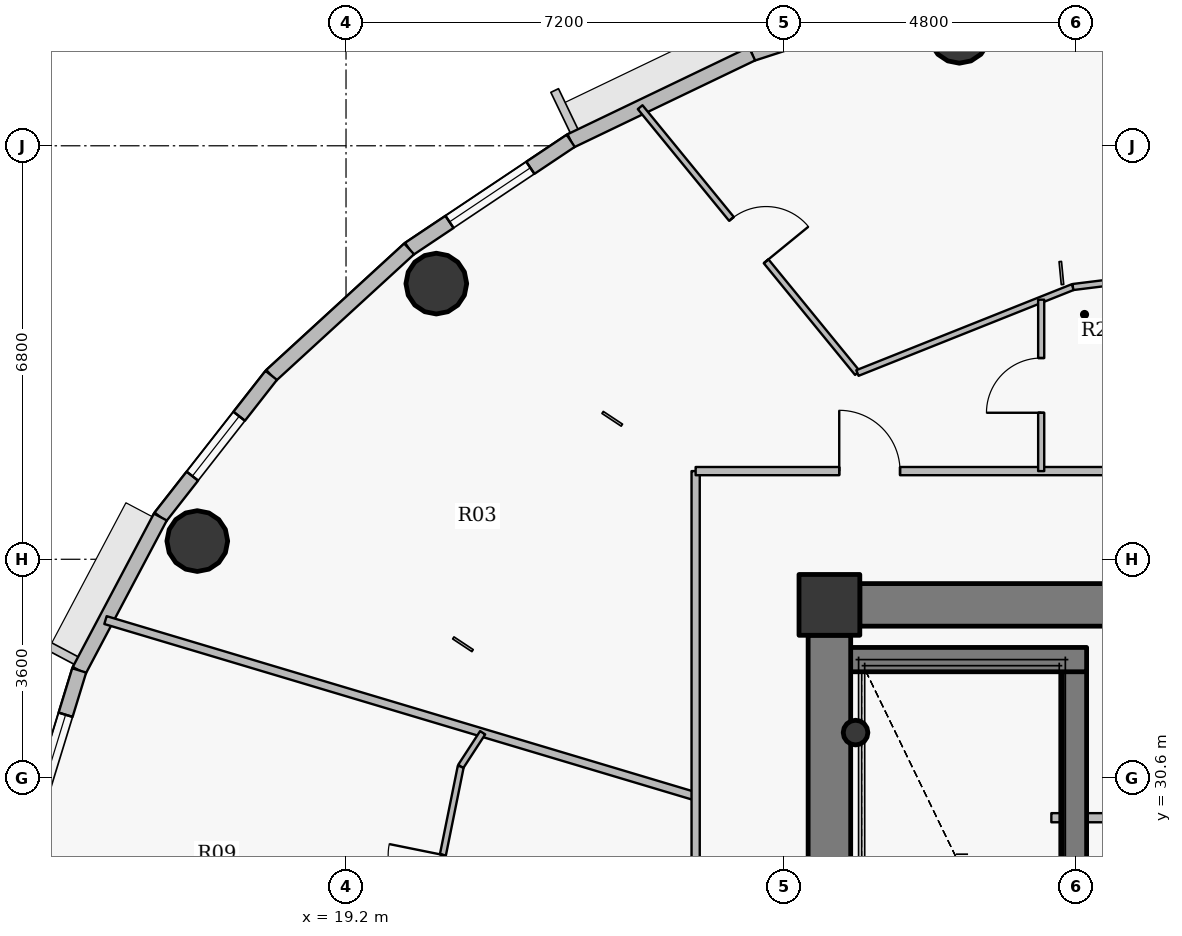
"""IFC4 building model, lengths in metres.
Left out: names, types, materials, properties, quantities, classifications, styles, units other than length and angle.
Written with IfcOpenShell. Run it as: python <this file> out.ifc"""

import sys

from ifc_helpers import new_model, si_unit, direction, frame, frame_2d, origin, origin_2d, place, context, subcontext, project, spatial, rectangle, hollow_circle, extrude, source, transform, mapped, element, fill, save


model = new_model("IFC4")
c1 = context("Model", 3, precision=1e-05, world=origin(), true_north=direction((0.0, 1.0)))
c2 = subcontext(c1, "Body", "Model", "MODEL_VIEW")
j1 = project(units=[si_unit("LENGTHUNIT", "METRE"), si_unit("PLANEANGLEUNIT", "RADIAN")], contexts=[c1])
p1 = place(None, origin())
s1 = spatial("IfcSite", under=j1, at=p1, CompositionType="ELEMENT")
p2 = place(p1, origin())
s2 = spatial("IfcBuilding", under=s1, at=p2, CompositionType="ELEMENT")
p3 = place(p2, frame((0.0, 0.0, 273.0)))
s3 = spatial("IfcBuildingStorey", under=s2, at=p3, CompositionType="ELEMENT", Elevation=273.0)
p4 = place(p3, frame((27.15, 33.45, 0.0), z_axis=(0.0, 0.0, 1.0), x_axis=(1.0, 0.0, 0.0)))
e1 = element("IfcColumn", 1, at=p4, inside=s3, PredefinedType="COLUMN", context=c2, shape_type="SweptSolid", body=[
    extrude(rectangle(XDim=1.0, YDim=1.0, at=origin_2d()), origin(), (0.0, 0.0, 1.0), 3.75),
])
p5 = place(p3, frame((31.18, 27.8, 0.0), z_axis=(0.0, 0.0, 1.0), x_axis=(0.0, 1.0, 0.0)))
e2 = element("IfcWall", 2, at=p5, inside=s3, PredefinedType="SHEAR", context=c2, shape_type="SweptSolid", body=[
    extrude(rectangle(XDim=4.75, YDim=0.4, at=frame_2d((2.375, 0.0))), origin(), (0.0, 0.0, 1.0), 3.75),
])
p6 = place(p3, frame((27.25, 32.55, 0.0), z_axis=(0.0, 0.0, 1.0), x_axis=(1.0, 0.0, 0.0)))
e3 = element("IfcWall", 3, at=p6, inside=s3, PredefinedType="SHEAR", context=c2, shape_type="SweptSolid", body=[
    extrude(rectangle(XDim=4.13, YDim=0.4, at=frame_2d((2.065, 0.0))), origin(), (0.0, 0.0, 1.0), 3.75),
])
p7 = place(p3, frame((27.58, 31.35, 0.0), z_axis=(0.0, 0.0, 1.0), x_axis=(1.0, 0.0, 0.0)))
e4 = element("IfcColumn", 4, at=p7, inside=s3, PredefinedType="COLUMN", context=c2, shape_type="SweptSolid", body=[
    extrude(hollow_circle(Radius=0.203, WallThickness=0.016, at=origin_2d()), origin(), (0.0, 0.0, 1.0), 3.75),
])
p8 = place(p3, frame((27.65, 33.45, 0.0), z_axis=(0.0, 0.0, 1.0), x_axis=(1.0, 0.0, 0.0)))
e5 = element("IfcWall", 5, at=p8, inside=s3, PredefinedType="SHEAR", context=c2, shape_type="SweptSolid", body=[
    extrude(rectangle(XDim=16.7, YDim=0.7, at=frame_2d((8.35, 0.0))), origin(), (0.0, 0.0, 1.0), 3.05),
])
p9 = place(p8, frame((12.775, 0.0, 0.0)))
e6 = element("IfcOpeningElement", 6, at=p9, cuts=e5, PredefinedType="OPENING", context=c2, shape_type="SweptSolid", body=[
    extrude(rectangle(XDim=1.15, YDim=2.15, at=origin_2d()), frame((0.575, 0.36, 1.075), z_axis=(0.0, -1.0, 0.0), x_axis=(1.0, 0.0, 0.0)), (0.0, 0.0, 1.0), 0.72),
])
p10 = place(p3, frame((27.15, 21.05, 0.0), z_axis=(0.0, 0.0, 1.0), x_axis=(0.0, 1.0, 0.0)))
e7 = element("IfcWall", 7, at=p10, inside=s3, PredefinedType="SHEAR", context=c2, shape_type="SweptSolid", body=[
    extrude(rectangle(XDim=11.9, YDim=0.7, at=frame_2d((5.95, 0.0))), origin(), (0.0, 0.0, 1.0), 3.05),
])
for number, where, z_axis, x_axis in (
    (8, (29.288, 42.858, 0.0), (0.0, 0.0, 1.0), (1.0, 0.0, 0.0)),
    (9, (20.685, 38.733, 0.0), (0.0, 0.0, 1.0), (1.0, 0.0, 0.0)),
    (10, (16.754, 34.5, 0.0), (0.0, 0.0, 1.0), (1.0, 0.0, 0.0)),
):
    element("IfcColumn", number, at=place(p3, frame(where, z_axis=z_axis, x_axis=x_axis)), inside=s3, PredefinedType="COLUMN", context=c2, shape_type="SweptSolid", body=[
        extrude(hollow_circle(Radius=0.5, WallThickness=0.032, at=origin_2d()), origin(), (0.0, 0.0, 1.0), 3.75),
    ])
p11 = place(p3, frame((25.877, 42.512, 0.0), z_axis=(0.0, 0.0, 1.0), x_axis=(0.95123136723, 0.308478339592, 0.0)))
e11 = element("IfcWall", 11, at=p11, inside=s3, PredefinedType="SOLIDWALL", context=c2, shape_type="SweptSolid", body=[
    extrude(rectangle(XDim=3.398, YDim=0.24, at=frame_2d((1.699, 0.0))), origin(), (0.0, 0.0, 1.0), 3.5),
])
p12 = place(p11, frame((0.899, 0.0, 0.9)))
e12 = element("IfcOpeningElement", 12, at=p12, cuts=e11, PredefinedType="OPENING", context=c2, shape_type="SweptSolid", body=[
    extrude(rectangle(XDim=1.6, YDim=1.75, at=origin_2d()), frame((0.8, 0.13, 0.875), z_axis=(0.0, -1.0, 0.0), x_axis=(1.0, 0.0, 0.0)), (0.0, 0.0, 1.0), 0.26),
])
p13 = place(p3, frame((22.896, 41.082, 0.0), z_axis=(0.0, 0.0, 1.0), x_axis=(0.901573741254, 0.43262546051, 0.0)))
e13 = element("IfcWall", 13, at=p13, inside=s3, PredefinedType="SOLIDWALL", context=c2, shape_type="SweptSolid", body=[
    extrude(rectangle(XDim=3.307, YDim=0.24, at=frame_2d((1.653, 0.0))), origin(), (0.0, 0.0, 1.0), 3.5),
])
p14 = place(p3, frame((20.238, 39.304, 0.0), z_axis=(0.0, 0.0, 1.0), x_axis=(0.831250592635, 0.55589787933, 0.0)))
e14 = element("IfcWall", 14, at=p14, inside=s3, PredefinedType="SOLIDWALL", context=c2, shape_type="SweptSolid", body=[
    extrude(rectangle(XDim=3.197, YDim=0.24, at=frame_2d((1.599, 0.0))), origin(), (0.0, 0.0, 1.0), 3.5),
])
p15 = place(p14, frame((0.799, 0.0, 0.9)))
e15 = element("IfcOpeningElement", 15, at=p15, cuts=e14, PredefinedType="OPENING", context=c2, shape_type="SweptSolid", body=[
    extrude(rectangle(XDim=1.6, YDim=1.75, at=origin_2d()), frame((0.8, 0.13, 0.875), z_axis=(0.0, -1.0, 0.0), x_axis=(1.0, 0.0, 0.0)), (0.0, 0.0, 1.0), 0.26),
])
p16 = place(p3, frame((17.97, 37.225, 0.0), z_axis=(0.0, 0.0, 1.0), x_axis=(0.737068506972, 0.675818034703, 0.0)))
e16 = element("IfcWall", 16, at=p16, inside=s3, PredefinedType="SOLIDWALL", context=c2, shape_type="SweptSolid", body=[
    extrude(rectangle(XDim=3.077, YDim=0.24, at=frame_2d((1.539, 0.0))), origin(), (0.0, 0.0, 1.0), 3.5),
])
p17 = place(p3, frame((16.146, 34.895, 0.0), z_axis=(0.0, 0.0, 1.0), x_axis=(0.616337186556, 0.787482363275, 0.0)))
e17 = element("IfcWall", 17, at=p17, inside=s3, PredefinedType="SOLIDWALL", context=c2, shape_type="SweptSolid", body=[
    extrude(rectangle(XDim=2.958, YDim=0.24, at=frame_2d((1.479, 0.0))), origin(), (0.0, 0.0, 1.0), 3.5),
])
p18 = place(p17, frame((0.854, 0.0, 0.9)))
e18 = element("IfcOpeningElement", 18, at=p18, cuts=e17, PredefinedType="OPENING", context=c2, shape_type="SweptSolid", body=[
    extrude(rectangle(XDim=1.25, YDim=1.65, at=origin_2d()), frame((0.625, 0.13, 0.825), z_axis=(0.0, -1.0, 0.0), x_axis=(1.0, 0.0, 0.0)), (0.0, 0.0, 1.0), 0.26),
])
p19 = place(p3, frame((14.812, 32.372, 0.0), z_axis=(0.0, 0.0, 1.0), x_axis=(0.467628269026, 0.883925224218, 0.0)))
e19 = element("IfcWall", 19, at=p19, inside=s3, PredefinedType="SOLIDWALL", context=c2, shape_type="SweptSolid", body=[
    extrude(rectangle(XDim=2.854, YDim=0.24, at=frame_2d((1.427, 0.0))), origin(), (0.0, 0.0, 1.0), 3.5),
])
p20 = place(p3, frame((13.998, 29.719, 0.0), z_axis=(0.0, 0.0, 1.0), x_axis=(0.2931213403, 0.956075248012, 0.0)))
e20 = element("IfcWall", 20, at=p20, inside=s3, PredefinedType="SOLIDWALL", context=c2, shape_type="SweptSolid", body=[
    extrude(rectangle(XDim=2.775, YDim=0.24, at=frame_2d((1.388, 0.0))), origin(), (0.0, 0.0, 1.0), 3.5),
])
p21 = place(p20, frame((0.763, 0.0, 0.9)))
e21 = element("IfcOpeningElement", 21, at=p21, cuts=e20, PredefinedType="OPENING", context=c2, shape_type="SweptSolid", body=[
    extrude(rectangle(XDim=1.25, YDim=1.65, at=origin_2d()), frame((0.625, 0.13, 0.825), z_axis=(0.0, -1.0, 0.0), x_axis=(1.0, 0.0, 0.0)), (0.0, 0.0, 1.0), 0.26),
])
p22 = place(p3, frame((15.244, 33.2, 0.0), z_axis=(0.0, 0.0, 1.0), x_axis=(0.958167234785, -0.286208927508, 0.0)))
e22 = element("IfcWall", 22, at=p22, inside=s3, PredefinedType="PARTITIONING", context=c2, shape_type="SweptSolid", body=[
    extrude(rectangle(XDim=10.13, YDim=0.135, at=frame_2d((5.065, 0.0))), origin(), (0.0, 0.0, 1.0), 2.985),
])
p23 = place(p3, frame((20.32, 27.0, 0.0), z_axis=(0.0, 0.0, 1.0), x_axis=(0.198226068862, 0.980156327135, 0.0)))
e23 = element("IfcWall", 23, at=p23, inside=s3, PredefinedType="PARTITIONING", context=c2, shape_type="SweptSolid", body=[
    extrude(rectangle(XDim=3.871, YDim=0.1, at=frame_2d((1.936, 0.0))), origin(), (0.0, 0.0, 1.0), 3.035),
])
p24 = place(p23, frame((1.486, 0.0, 0.0)))
e24 = element("IfcOpeningElement", 24, at=p24, cuts=e23, PredefinedType="OPENING", context=c2, shape_type="SweptSolid", body=[
    extrude(rectangle(XDim=0.9, YDim=2.1, at=origin_2d()), frame((0.45, 0.06, 1.05), z_axis=(0.0, -1.0, 0.0), x_axis=(1.0, 0.0, 0.0)), (0.0, 0.0, 1.0), 0.12),
])
p25 = place(p3, frame((21.087, 30.794, 0.0), z_axis=(0.0, 0.0, 1.0), x_axis=(0.545443507803, 0.838147588313, 0.0)))
e25 = element("IfcWall", 25, at=p25, inside=s3, PredefinedType="PARTITIONING", context=c2, shape_type="SweptSolid", body=[
    extrude(rectangle(XDim=0.66, YDim=0.1, at=frame_2d((0.33, 0.0))), origin(), (0.0, 0.0, 1.0), 3.5),
])
p26 = place(p3, frame((24.037, 41.635, 0.0), z_axis=(0.0, 0.0, 1.0), x_axis=(0.632896331295, -0.774236549017, 0.0)))
e26 = element("IfcWall", 26, at=p26, inside=s3, PredefinedType="PARTITIONING", context=c2, shape_type="SweptSolid", body=[
    extrude(rectangle(XDim=5.647, YDim=0.1, at=frame_2d((2.823, 0.0))), origin(), (0.0, 0.0, 1.0), 2.985),
])
p27 = place(p26, frame((2.373, 0.0, 0.0)))
e27 = element("IfcOpeningElement", 27, at=p27, cuts=e26, PredefinedType="OPENING", context=c2, shape_type="SweptSolid", body=[
    extrude(rectangle(XDim=0.9, YDim=2.1, at=origin_2d()), frame((0.45, 0.06, 1.05), z_axis=(0.0, -1.0, 0.0), x_axis=(1.0, 0.0, 0.0)), (0.0, 0.0, 1.0), 0.12),
])
p28 = place(p3, frame((24.95, 18.35, 0.0), z_axis=(0.0, 0.0, 1.0), x_axis=(0.0, 1.0, 0.0)))
e28 = element("IfcWall", 28, at=p28, inside=s3, PredefinedType="PARTITIONING", context=c2, shape_type="SweptSolid", body=[
    extrude(rectangle(XDim=17.3, YDim=0.135, at=frame_2d((8.65, 0.0))), origin(), (0.0, 0.0, 1.0), 3.035),
])
p29 = place(p28, frame((5.495, 0.0, 0.0)))
e29 = element("IfcOpeningElement", 29, at=p29, cuts=e28, PredefinedType="OPENING", context=c2, shape_type="SweptSolid", body=[
    extrude(rectangle(XDim=1.0, YDim=2.15, at=origin_2d()), frame((0.5, 0.078, 1.075), z_axis=(0.0, -1.0, 0.0), x_axis=(1.0, 0.0, 0.0)), (0.0, 0.0, 1.0), 0.155),
])
p30 = place(p3, frame((24.95, 35.65, 0.0), z_axis=(0.0, 0.0, 1.0), x_axis=(1.0, 0.0, 0.0)))
e30 = element("IfcWall", 30, at=p30, inside=s3, PredefinedType="PARTITIONING", context=c2, shape_type="SweptSolid", body=[
    extrude(rectangle(XDim=10.1, YDim=0.135, at=frame_2d((5.05, 0.0))), origin(), (0.0, 0.0, 1.0), 3.035),
])
p31 = place(p30, frame((2.362, 0.0, 0.0)))
e31 = element("IfcOpeningElement", 31, at=p31, cuts=e30, PredefinedType="OPENING", context=c2, shape_type="SweptSolid", body=[
    extrude(rectangle(XDim=1.0, YDim=2.15, at=origin_2d()), frame((0.5, 0.078, 1.075), z_axis=(0.0, -1.0, 0.0), x_axis=(1.0, 0.0, 0.0)), (0.0, 0.0, 1.0), 0.155),
])
p32 = place(p3, frame((27.611, 37.263, 0.0), z_axis=(0.0, 0.0, 1.0), x_axis=(0.92879851462, 0.370585103911, 0.0)))
e32 = element("IfcWall", 32, at=p32, inside=s3, PredefinedType="PARTITIONING", context=c2, shape_type="SweptSolid", body=[
    extrude(rectangle(XDim=3.815, YDim=0.1, at=frame_2d((1.908, 0.0))), origin(), (0.0, 0.0, 1.0), 3.035),
])
p33 = place(p3, frame((30.633, 35.65, 0.0), z_axis=(0.0, 0.0, 1.0), x_axis=(0.0, 1.0, 0.0)))
e33 = element("IfcWall", 33, at=p33, inside=s3, PredefinedType="PARTITIONING", context=c2, shape_type="SweptSolid", body=[
    extrude(rectangle(XDim=2.819, YDim=0.1, at=frame_2d((1.41, 0.0))), origin(), (0.0, 0.0, 1.0), 3.5),
])
p34 = place(p33, frame((0.959, 0.0, 0.0)))
e34 = element("IfcOpeningElement", 34, at=p34, cuts=e33, PredefinedType="OPENING", context=c2, shape_type="SweptSolid", body=[
    extrude(rectangle(XDim=0.9, YDim=2.1, at=origin_2d()), frame((0.45, 0.06, 1.05), z_axis=(0.0, -1.0, 0.0), x_axis=(1.0, 0.0, 0.0)), (0.0, 0.0, 1.0), 0.12),
])
p35 = place(p3, frame((30.8, 29.95, 0.0), z_axis=(0.0, 0.0, 1.0), x_axis=(1.0, 0.0, 0.0)))
e35 = element("IfcWall", 35, at=p35, inside=s3, PredefinedType="PARTITIONING", context=c2, shape_type="SweptSolid", body=[
    extrude(rectangle(XDim=3.1, YDim=0.15, at=frame_2d((1.55, 0.0))), origin(), (0.0, 0.0, 1.0), 3.085),
])
p36 = place(p3, frame((31.155, 38.677, 0.0), z_axis=(0.0, 0.0, 1.0), x_axis=(0.99239360053, 0.123105408601, 0.0)))
e36 = element("IfcWall", 36, at=p36, inside=s3, PredefinedType="PARTITIONING", context=c2, shape_type="SweptSolid", body=[
    extrude(rectangle(XDim=4.883, YDim=0.1, at=frame_2d((2.441, 0.0))), origin(), (0.0, 0.0, 1.0), 3.035),
])
p37 = place(p3, frame((27.64, 33.8, 0.0), z_axis=(0.0, 0.0, 1.0), x_axis=(-1.0, 0.0, 0.0)))
e37 = element("IfcWall", 37, at=p37, inside=s3, PredefinedType="PARTITIONING", context=c2, shape_type="SweptSolid", body=[
    extrude(rectangle(XDim=0.84, YDim=0.135, at=frame_2d((0.42, 0.0))), origin(), (0.0, 0.0, 1.0), 3.035),
])
p38 = place(p3, frame((26.8, 33.492, 0.0), z_axis=(0.0, 0.0, 1.0), x_axis=(0.0, -1.0, 0.0)))
e38 = element("IfcWall", 38, at=p38, inside=s3, PredefinedType="PARTITIONING", context=c2, shape_type="SweptSolid", body=[
    extrude(rectangle(XDim=0.532, YDim=0.135, at=frame_2d((0.266, 0.0))), origin(), (0.0, 0.0, 1.0), 3.5),
])
m1 = source(origin(), c2, "Body", "SweptSolid", [
    extrude(rectangle(XDim=1.6, YDim=1.75, at=origin_2d()), frame((0.8, 0.03, 0.875), z_axis=(0.0, -1.0, 0.0), x_axis=(1.0, 0.0, 0.0)), (0.0, 0.0, 1.0), 0.06),
])
p39 = place(p15, origin())
e39 = element("IfcWindow", 39, at=p39, inside=s3, PartitioningType="DOUBLE_PANEL_VERTICAL", PredefinedType="WINDOW", context=c2, shape_type="MappedRepresentation", body=[
    mapped(m1, transform((0.0, 0.0, 0.0), x_axis=(1.0, 0.0, 0.0), y_axis=(0.0, 1.0, 0.0), z_axis=(0.0, 0.0, 1.0), scale=1.0)),
])
fill(e15, e39)
m2 = source(origin(), c2, "Body", "SweptSolid", [
    extrude(rectangle(XDim=1.25, YDim=1.65, at=origin_2d()), frame((0.625, 0.03, 0.825), z_axis=(0.0, -1.0, 0.0), x_axis=(1.0, 0.0, 0.0)), (0.0, 0.0, 1.0), 0.06),
])
p40 = place(p18, origin())
e40 = element("IfcWindow", 40, at=p40, inside=s3, PartitioningType="SINGLE_PANEL", PredefinedType="WINDOW", context=c2, shape_type="MappedRepresentation", body=[
    mapped(m2, transform((0.0, 0.0, 0.0), x_axis=(1.0, 0.0, 0.0), y_axis=(0.0, 1.0, 0.0), z_axis=(0.0, 0.0, 1.0), scale=1.0)),
])
fill(e18, e40)
p41 = place(p21, origin())
e41 = element("IfcWindow", 41, at=p41, inside=s3, PartitioningType="SINGLE_PANEL", PredefinedType="WINDOW", context=c2, shape_type="MappedRepresentation", body=[
    mapped(m2, transform((0.0, 0.0, 0.0), x_axis=(1.0, 0.0, 0.0), y_axis=(0.0, 1.0, 0.0), z_axis=(0.0, 0.0, 1.0), scale=1.0)),
])
fill(e21, e41)
m3 = source(origin(), c2, "Body", "SweptSolid", [
    extrude(rectangle(XDim=1.0, YDim=2.15, at=origin_2d()), frame((0.5, 0.025, 1.075), z_axis=(0.0, -1.0, 0.0), x_axis=(1.0, 0.0, 0.0)), (0.0, 0.0, 1.0), 0.05),
])
p42 = place(p31, origin())
e42 = element("IfcDoor", 42, at=p42, inside=s3, OperationType="SINGLE_SWING_LEFT", PredefinedType="DOOR", context=c2, shape_type="MappedRepresentation", body=[
    mapped(m3, transform((0.0, 0.0, 0.0), x_axis=(1.0, 0.0, 0.0), y_axis=(0.0, 1.0, 0.0), z_axis=(0.0, 0.0, 1.0), scale=1.0)),
])
fill(e31, e42)
m4 = source(origin(), c2, "Body", "SweptSolid", [
    extrude(rectangle(XDim=0.9, YDim=2.1, at=origin_2d()), frame((0.45, 0.025, 1.05), z_axis=(0.0, -1.0, 0.0), x_axis=(1.0, 0.0, 0.0)), (0.0, 0.0, 1.0), 0.05),
])
p43 = place(p27, origin())
e43 = element("IfcDoor", 43, at=p43, inside=s3, OperationType="SINGLE_SWING_RIGHT", PredefinedType="DOOR", context=c2, shape_type="MappedRepresentation", body=[
    mapped(m4, transform((0.0, 0.0, 0.0), x_axis=(1.0, 0.0, 0.0), y_axis=(0.0, 1.0, 0.0), z_axis=(0.0, 0.0, 1.0), scale=1.0)),
])
fill(e27, e43)
p44 = place(p34, origin())
e44 = element("IfcDoor", 44, at=p44, inside=s3, OperationType="SINGLE_SWING_LEFT", PredefinedType="DOOR", context=c2, shape_type="MappedRepresentation", body=[
    mapped(m4, transform((0.0, 0.0, 0.0), x_axis=(1.0, 0.0, 0.0), y_axis=(0.0, 1.0, 0.0), z_axis=(0.0, 0.0, 1.0), scale=1.0)),
])
fill(e34, e44)
p45 = place(p24, origin())
e45 = element("IfcDoor", 45, at=p45, inside=s3, OperationType="SINGLE_SWING_RIGHT", PredefinedType="DOOR", context=c2, shape_type="MappedRepresentation", body=[
    mapped(m4, transform((0.0, 0.0, 0.0), x_axis=(1.0, 0.0, 0.0), y_axis=(0.0, 1.0, 0.0), z_axis=(0.0, 0.0, 1.0), scale=1.0)),
])
fill(e24, e45)
save(model, sys.argv[1])
